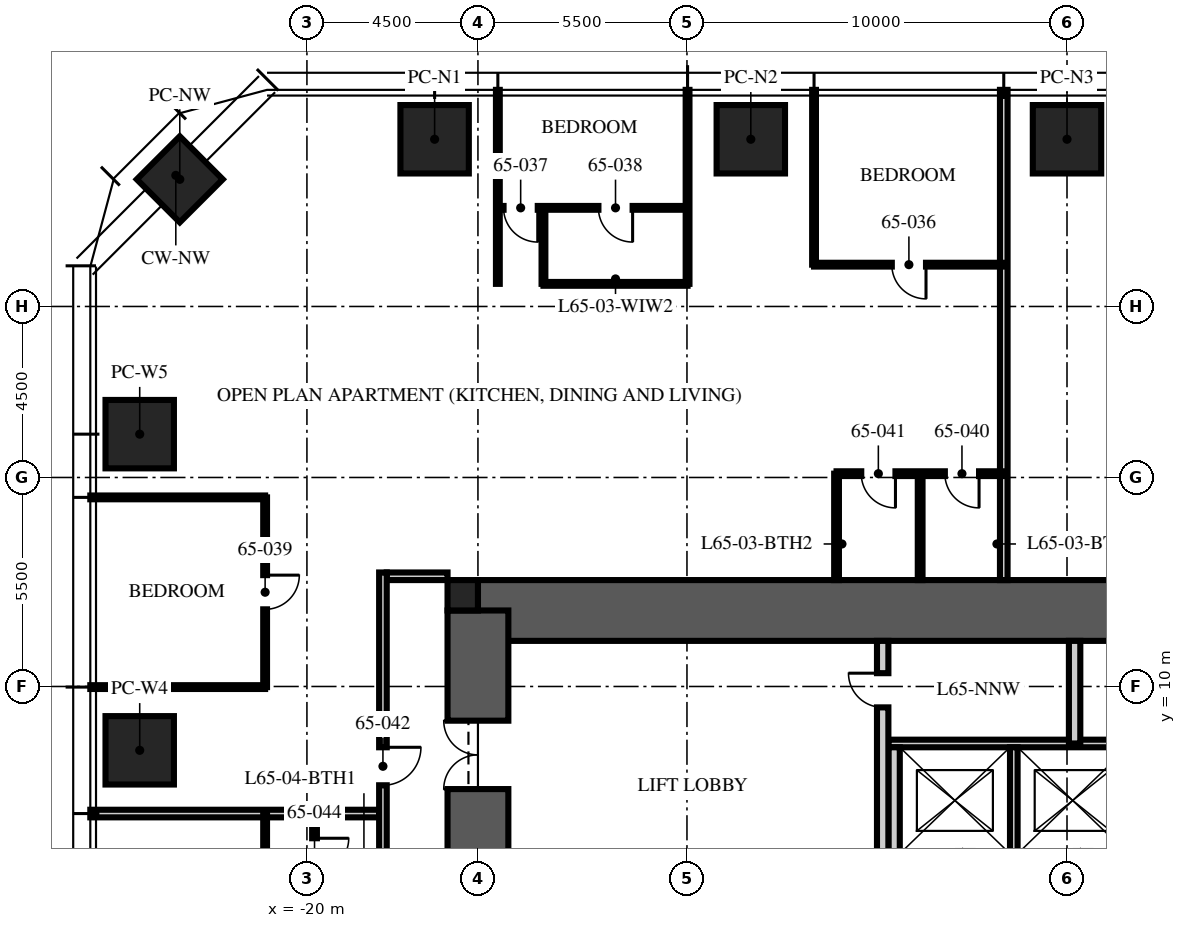
"""IFC4 building model, lengths in metres.
Left out: names, types, materials, properties, quantities, classifications, styles, units other than length and angle.
Written with IfcOpenShell. Run it as: python <this file> out.ifc"""

import sys

from ifc_helpers import new_model, si_unit, direction, frame, frame_2d, origin, origin_2d, place, context, subcontext, project, spatial, rectangle, extrude, element, fill, save


model = new_model("IFC4")
c1 = context("Model", 3, precision=1e-05, world=origin(), true_north=direction((0.0, 1.0)))
c2 = subcontext(c1, "Body", "Model", "MODEL_VIEW")
j1 = project(units=[si_unit("LENGTHUNIT", "METRE"), si_unit("PLANEANGLEUNIT", "RADIAN")], contexts=[c1])
p1 = place(None, origin())
s1 = spatial("IfcSite", under=j1, at=p1, CompositionType="ELEMENT")
p2 = place(p1, origin())
s2 = spatial("IfcBuilding", under=s1, at=p2, CompositionType="ELEMENT")
p3 = place(p2, frame((0.0, 0.0, 259.5)))
s3 = spatial("IfcBuildingStorey", under=s2, at=p3, CompositionType="ELEMENT", Elevation=259.5)
p4 = place(p3, frame((-15.5, 12.0, -0.25), z_axis=(0.0, 0.0, 1.0), x_axis=(1.0, 0.0, 0.0)))
e1 = element("IfcWall", 1, at=p4, inside=s3, PredefinedType="SHEAR", context=c2, shape_type="SweptSolid", body=[
    extrude(rectangle(XDim=31.0, YDim=1.6, at=frame_2d((15.5, 0.0))), origin(), (0.0, 0.0, 1.0), 3.75),
])
p5 = place(p3, frame((-15.5, -12.0, -0.25), z_axis=(0.0, 0.0, 1.0), x_axis=(0.0, 1.0, 0.0)))
e2 = element("IfcWall", 2, at=p5, inside=s3, PredefinedType="SHEAR", context=c2, shape_type="SweptSolid", body=[
    extrude(rectangle(XDim=24.0, YDim=1.6, at=frame_2d((12.0, 0.0))), origin(), (0.0, 0.0, 1.0), 3.75),
])
p6 = place(p5, frame((3.2, 0.0, 0.25)))
e3 = element("IfcOpeningElement", 3, at=p6, cuts=e2, PredefinedType="OPENING", context=c2, shape_type="SweptSolid", body=[
    extrude(rectangle(XDim=1.2, YDim=2.1, at=frame_2d((0.6, 1.05))), frame((0.0, 0.81, 0.0), z_axis=(0.0, -1.0, 0.0), x_axis=(1.0, 0.0, 0.0)), (0.0, 0.0, 1.0), 1.62),
])
p7 = place(p5, frame((19.3, 0.0, 0.25)))
e4 = element("IfcOpeningElement", 4, at=p7, cuts=e2, PredefinedType="OPENING", context=c2, shape_type="SweptSolid", body=[
    extrude(rectangle(XDim=1.8, YDim=2.1, at=frame_2d((0.9, 1.05))), frame((0.0, 0.81, 0.0), z_axis=(0.0, -1.0, 0.0), x_axis=(1.0, 0.0, 0.0)), (0.0, 0.0, 1.0), 1.62),
])
p8 = place(p3, frame((-15.9, 12.4, -0.25), z_axis=(0.0, 0.0, 1.0), x_axis=(1.0, 0.0, 0.0)))
e5 = element("IfcColumn", 5, at=p8, inside=s3, PredefinedType="COLUMN", context=c2, shape_type="SweptSolid", body=[
    extrude(rectangle(XDim=0.8, YDim=0.8, at=origin_2d()), origin(), (0.0, 0.0, 1.0), 3.75),
])
for number, where, z_axis, x_axis in (
    (6, (-16.64, 24.4, 0.0), (0.0, 0.0, 1.0), (1.0, 0.0, 0.0)),
    (7, (-8.32, 24.4, 0.0), (0.0, 0.0, 1.0), (1.0, 0.0, 0.0)),
    (8, (0.0, 24.4, 0.0), (0.0, 0.0, 1.0), (1.0, 0.0, 0.0)),
    (9, (-24.4, 8.32, 0.0), (0.0, 0.0, 1.0), (0.0, 1.0, 0.0)),
    (10, (-24.4, 16.64, 0.0), (0.0, 0.0, 1.0), (0.0, 1.0, 0.0)),
):
    element("IfcColumn", number, at=place(p3, frame(where, z_axis=z_axis, x_axis=x_axis)), inside=s3, PredefinedType="COLUMN", context=c2, shape_type="SweptSolid", body=[
        extrude(rectangle(XDim=1.8, YDim=1.8, at=origin_2d()), origin(), (0.0, 0.0, 1.0), 3.75),
    ])
p9 = place(p3, frame((-23.346, 23.346, 0.0), z_axis=(0.0, 0.0, 1.0), x_axis=(0.707106781187, 0.707106781187, 0.0)))
e11 = element("IfcColumn", 11, at=p9, inside=s3, PredefinedType="COLUMN", context=c2, shape_type="SweptSolid", body=[
    extrude(rectangle(XDim=1.6, YDim=1.6, at=origin_2d()), origin(), (0.0, 0.0, 1.0), 3.75),
])
p10 = place(p3, frame((-4.7, 8.5, 0.0), z_axis=(0.0, 0.0, 1.0), x_axis=(1.0, 0.0, 0.0)))
e12 = element("IfcWall", 12, at=p10, inside=s3, PredefinedType="PARTITIONING", context=c2, shape_type="SweptSolid", body=[
    extrude(rectangle(XDim=9.7, YDim=0.2, at=frame_2d((4.85, 0.0))), origin(), (0.0, 0.0, 1.0), 3.5),
])
p11 = place(p3, frame((-4.55, 5.6, 0.0), z_axis=(0.0, 0.0, 1.0), x_axis=(0.0, 1.0, 0.0)))
e13 = element("IfcWall", 13, at=p11, inside=s3, PredefinedType="PARTITIONING", context=c2, shape_type="SweptSolid", body=[
    extrude(rectangle(XDim=2.8, YDim=0.3, at=frame_2d((1.4, 0.0))), origin(), (0.0, 0.0, 1.0), 3.5),
])
p12 = place(p3, frame((-1.4, 5.6, 0.0), z_axis=(0.0, 0.0, 1.0), x_axis=(0.0, 1.0, 0.0)))
e14 = element("IfcWall", 14, at=p12, inside=s3, PredefinedType="PARTITIONING", context=c2, shape_type="SweptSolid", body=[
    extrude(rectangle(XDim=2.8, YDim=0.2, at=frame_2d((1.4, 0.0))), origin(), (0.0, 0.0, 1.0), 3.5),
])
p13 = place(p3, frame((-4.85, 5.3, 0.0), z_axis=(0.0, 0.0, 1.0), x_axis=(0.0, 1.0, 0.0)))
e15 = element("IfcWall", 15, at=p13, inside=s3, PredefinedType="PARTITIONING", context=c2, shape_type="SweptSolid", body=[
    extrude(rectangle(XDim=5.9, YDim=0.3, at=frame_2d((2.95, 0.0))), origin(), (0.0, 0.0, 1.0), 3.5),
])
p14 = place(p13, frame((4.15, 0.0, 0.0)))
e16 = element("IfcOpeningElement", 16, at=p14, cuts=e15, PredefinedType="OPENING", context=c2, shape_type="SweptSolid", body=[
    extrude(rectangle(XDim=0.9, YDim=2.1, at=frame_2d((0.45, 1.05))), frame((0.0, 0.16, 0.0), z_axis=(0.0, -1.0, 0.0), x_axis=(1.0, 0.0, 0.0)), (0.0, 0.0, 1.0), 0.32),
])
p15 = place(p3, frame((0.2, 8.5, 0.0), z_axis=(0.0, 0.0, 1.0), x_axis=(0.0, 1.0, 0.0)))
e17 = element("IfcWall", 17, at=p15, inside=s3, PredefinedType="PARTITIONING", context=c2, shape_type="SweptSolid", body=[
    extrude(rectangle(XDim=2.7, YDim=0.3, at=frame_2d((1.35, 0.0))), origin(), (0.0, 0.0, 1.0), 3.5),
])
p16 = place(p3, frame((-16.3, 12.9, 0.0), z_axis=(0.0, 0.0, 1.0), x_axis=(-1.0, 0.0, 0.0)))
e18 = element("IfcWall", 18, at=p16, inside=s3, PredefinedType="PARTITIONING", context=c2, shape_type="SweptSolid", body=[
    extrude(rectangle(XDim=1.6, YDim=0.2, at=frame_2d((0.8, 0.0))), origin(), (0.0, 0.0, 1.0), 2.3),
])
p17 = place(p3, frame((-1.664, 12.8, 0.0), z_axis=(0.0, 0.0, 1.0), x_axis=(0.0, 1.0, 0.0)))
e19 = element("IfcWall", 19, at=p17, inside=s3, PredefinedType="PARTITIONING", context=c2, shape_type="SweptSolid", body=[
    extrude(rectangle(XDim=12.9, YDim=0.2, at=frame_2d((6.45, 0.0))), origin(), (0.0, 0.0, 1.0), 2.91),
])
p18 = place(p3, frame((-6.656, 21.1, 0.0), z_axis=(0.0, 0.0, 1.0), x_axis=(0.0, 1.0, 0.0)))
e20 = element("IfcWall", 20, at=p18, inside=s3, PredefinedType="PARTITIONING", context=c2, shape_type="SweptSolid", body=[
    extrude(rectangle(XDim=4.6, YDim=0.1, at=frame_2d((2.3, 0.0))), origin(), (0.0, 0.0, 1.0), 2.91),
])
for number, where, z_axis, x_axis in (
    (21, (-9.984, 20.595, 0.0), (0.0, 0.0, 1.0), (0.0, 1.0, 0.0)),
    (22, (-14.976, 20.595, 0.0), (0.0, 0.0, 1.0), (0.0, 1.0, 0.0)),
):
    element("IfcWall", number, at=place(p3, frame(where, z_axis=z_axis, x_axis=x_axis)), inside=s3, PredefinedType="PARTITIONING", context=c2, shape_type="SweptSolid", body=[
        extrude(rectangle(XDim=5.105, YDim=0.1, at=frame_2d((2.552, 0.0))), origin(), (0.0, 0.0, 1.0), 2.91),
    ])
for number, where, z_axis, x_axis in (
    (23, (-21.1, 14.976, 0.0), (0.0, 0.0, 1.0), (-1.0, 0.0, 0.0)),
    (24, (-21.1, 9.984, 0.0), (0.0, 0.0, 1.0), (-1.0, 0.0, 0.0)),
):
    element("IfcWall", number, at=place(p3, frame(where, z_axis=z_axis, x_axis=x_axis)), inside=s3, PredefinedType="PARTITIONING", context=c2, shape_type="SweptSolid", body=[
        extrude(rectangle(XDim=4.6, YDim=0.1, at=frame_2d((2.3, 0.0))), origin(), (0.0, 0.0, 1.0), 2.91),
    ])
p19 = place(p3, frame((-18.1, 6.656, 0.0), z_axis=(0.0, 0.0, 1.0), x_axis=(-1.0, 0.0, 0.0)))
e25 = element("IfcWall", 25, at=p19, inside=s3, PredefinedType="PARTITIONING", context=c2, shape_type="SweptSolid", body=[
    extrude(rectangle(XDim=7.6, YDim=0.2, at=frame_2d((3.8, 0.0))), origin(), (0.0, 0.0, 1.0), 2.91),
])
p20 = place(p3, frame((-1.664, 21.1, 0.0), z_axis=(0.0, 0.0, 1.0), x_axis=(-1.0, 0.0, 0.0)))
e26 = element("IfcWall", 26, at=p20, inside=s3, PredefinedType="PARTITIONING", context=c2, shape_type="SweptSolid", body=[
    extrude(rectangle(XDim=4.992, YDim=0.1, at=frame_2d((2.496, 0.0))), origin(), (0.0, 0.0, 1.0), 2.81),
])
p21 = place(p20, frame((2.046, 0.0, 0.0)))
e27 = element("IfcOpeningElement", 27, at=p21, cuts=e26, PredefinedType="OPENING", context=c2, shape_type="SweptSolid", body=[
    extrude(rectangle(XDim=0.9, YDim=2.1, at=frame_2d((0.45, 1.05))), frame((0.0, 0.06, 0.0), z_axis=(0.0, -1.0, 0.0), x_axis=(1.0, 0.0, 0.0)), (0.0, 0.0, 1.0), 0.12),
])
p22 = place(p3, frame((-9.984, 22.595, 0.0), z_axis=(0.0, 0.0, 1.0), x_axis=(-1.0, 0.0, 0.0)))
e28 = element("IfcWall", 28, at=p22, inside=s3, PredefinedType="PARTITIONING", context=c2, shape_type="SweptSolid", body=[
    extrude(rectangle(XDim=4.992, YDim=0.1, at=frame_2d((2.496, 0.0))), origin(), (0.0, 0.0, 1.0), 2.81),
])
p23 = place(p22, frame((3.942, 0.0, 0.0)))
e29 = element("IfcOpeningElement", 29, at=p23, cuts=e28, PredefinedType="OPENING", context=c2, shape_type="SweptSolid", body=[
    extrude(rectangle(XDim=0.9, YDim=2.1, at=frame_2d((0.45, 1.05))), frame((0.0, 0.06, 0.0), z_axis=(0.0, -1.0, 0.0), x_axis=(1.0, 0.0, 0.0)), (0.0, 0.0, 1.0), 0.12),
])
p24 = place(p22, frame((1.446, 0.0, 0.0)))
e30 = element("IfcOpeningElement", 30, at=p24, cuts=e28, PredefinedType="OPENING", context=c2, shape_type="SweptSolid", body=[
    extrude(rectangle(XDim=0.9, YDim=2.1, at=frame_2d((0.45, 1.05))), frame((0.0, 0.06, 0.0), z_axis=(0.0, -1.0, 0.0), x_axis=(1.0, 0.0, 0.0)), (0.0, 0.0, 1.0), 0.12),
])
p25 = place(p3, frame((-13.776, 20.595, 0.0), z_axis=(0.0, 0.0, 1.0), x_axis=(0.0, 1.0, 0.0)))
e31 = element("IfcWall", 31, at=p25, inside=s3, PredefinedType="PARTITIONING", context=c2, shape_type="SweptSolid", body=[
    extrude(rectangle(XDim=2.0, YDim=0.1, at=frame_2d((1.0, 0.0))), origin(), (0.0, 0.0, 1.0), 3.5),
])
p26 = place(p3, frame((-9.984, 20.595, 0.0), z_axis=(0.0, 0.0, 1.0), x_axis=(-1.0, 0.0, 0.0)))
e32 = element("IfcWall", 32, at=p26, inside=s3, PredefinedType="PARTITIONING", context=c2, shape_type="SweptSolid", body=[
    extrude(rectangle(XDim=3.792, YDim=0.1, at=frame_2d((1.896, 0.0))), origin(), (0.0, 0.0, 1.0), 2.81),
])
p27 = place(p3, frame((-21.1, 14.976, 0.0), z_axis=(0.0, 0.0, 1.0), x_axis=(0.0, -1.0, 0.0)))
e33 = element("IfcWall", 33, at=p27, inside=s3, PredefinedType="PARTITIONING", context=c2, shape_type="SweptSolid", body=[
    extrude(rectangle(XDim=4.992, YDim=0.1, at=frame_2d((2.496, 0.0))), origin(), (0.0, 0.0, 1.0), 2.81),
])
p28 = place(p27, frame((2.046, 0.0, 0.0)))
e34 = element("IfcOpeningElement", 34, at=p28, cuts=e33, PredefinedType="OPENING", context=c2, shape_type="SweptSolid", body=[
    extrude(rectangle(XDim=0.9, YDim=2.1, at=frame_2d((0.45, 1.05))), frame((0.0, 0.06, 0.0), z_axis=(0.0, -1.0, 0.0), x_axis=(1.0, 0.0, 0.0)), (0.0, 0.0, 1.0), 0.12),
])
p29 = place(p3, frame((-1.664, 15.6, 0.0), z_axis=(0.0, 0.0, 1.0), x_axis=(-1.0, 0.0, 0.0)))
e35 = element("IfcWall", 35, at=p29, inside=s3, PredefinedType="PARTITIONING", context=c2, shape_type="SweptSolid", body=[
    extrude(rectangle(XDim=4.4, YDim=0.125, at=frame_2d((2.2, 0.0))), origin(), (0.0, 0.0, 1.0), 2.81),
])
p30 = place(p29, frame((0.65, 0.0, 0.0)))
e36 = element("IfcOpeningElement", 36, at=p30, cuts=e35, PredefinedType="OPENING", context=c2, shape_type="SweptSolid", body=[
    extrude(rectangle(XDim=0.9, YDim=2.1, at=frame_2d((0.45, 1.05))), frame((0.0, 0.073, 0.0), z_axis=(0.0, -1.0, 0.0), x_axis=(1.0, 0.0, 0.0)), (0.0, 0.0, 1.0), 0.145),
])
p31 = place(p29, frame((2.85, 0.0, 0.0)))
e37 = element("IfcOpeningElement", 37, at=p31, cuts=e35, PredefinedType="OPENING", context=c2, shape_type="SweptSolid", body=[
    extrude(rectangle(XDim=0.9, YDim=2.1, at=frame_2d((0.45, 1.05))), frame((0.0, 0.073, 0.0), z_axis=(0.0, -1.0, 0.0), x_axis=(1.0, 0.0, 0.0)), (0.0, 0.0, 1.0), 0.145),
])
for number, where, z_axis, x_axis in (
    (38, (-3.864, 12.8, 0.0), (0.0, 0.0, 1.0), (0.0, 1.0, 0.0)),
    (39, (-6.064, 12.8, 0.0), (0.0, 0.0, 1.0), (0.0, 1.0, 0.0)),
):
    element("IfcWall", number, at=place(p3, frame(where, z_axis=z_axis, x_axis=x_axis)), inside=s3, PredefinedType="PARTITIONING", context=c2, shape_type="SweptSolid", body=[
        extrude(rectangle(XDim=2.8, YDim=0.125, at=frame_2d((1.4, 0.0))), origin(), (0.0, 0.0, 1.0), 3.5),
    ])
p32 = place(p3, frame((-21.1, 6.656, 0.0), z_axis=(0.0, 0.0, 1.0), x_axis=(0.0, -1.0, 0.0)))
e40 = element("IfcWall", 40, at=p32, inside=s3, PredefinedType="PARTITIONING", context=c2, shape_type="SweptSolid", body=[
    extrude(rectangle(XDim=4.992, YDim=0.1, at=frame_2d((2.496, 0.0))), origin(), (0.0, 0.0, 1.0), 2.81),
])
p33 = place(p32, frame((2.046, 0.0, 0.0)))
e41 = element("IfcOpeningElement", 41, at=p33, cuts=e40, PredefinedType="OPENING", context=c2, shape_type="SweptSolid", body=[
    extrude(rectangle(XDim=0.9, YDim=2.1, at=frame_2d((0.45, 1.05))), frame((0.0, 0.06, 0.0), z_axis=(0.0, -1.0, 0.0), x_axis=(1.0, 0.0, 0.0)), (0.0, 0.0, 1.0), 0.12),
])
p34 = place(p3, frame((-19.8, 6.656, 0.0), z_axis=(0.0, 0.0, 1.0), x_axis=(0.0, -1.0, 0.0)))
e42 = element("IfcWall", 42, at=p34, inside=s3, PredefinedType="PARTITIONING", context=c2, shape_type="SweptSolid", body=[
    extrude(rectangle(XDim=2.2, YDim=0.125, at=frame_2d((1.1, 0.0))), origin(), (0.0, 0.0, 1.0), 3.5),
])
p35 = place(p34, frame((0.65, 0.0, 0.0)))
e43 = element("IfcOpeningElement", 43, at=p35, cuts=e42, PredefinedType="OPENING", context=c2, shape_type="SweptSolid", body=[
    extrude(rectangle(XDim=0.9, YDim=2.1, at=frame_2d((0.45, 1.05))), frame((0.0, 0.073, 0.0), z_axis=(0.0, -1.0, 0.0), x_axis=(1.0, 0.0, 0.0)), (0.0, 0.0, 1.0), 0.145),
])
p36 = place(p3, frame((-18.0, 13.0, 0.0), z_axis=(0.0, 0.0, 1.0), x_axis=(0.0, -1.0, 0.0)))
e44 = element("IfcWall", 44, at=p36, inside=s3, PredefinedType="PARTITIONING", context=c2, shape_type="SweptSolid", body=[
    extrude(rectangle(XDim=25.8, YDim=0.2, at=frame_2d((12.9, 0.0))), origin(), (0.0, 0.0, 1.0), 2.6),
])
p37 = place(p36, frame((4.6, 0.0, 0.0)))
e45 = element("IfcOpeningElement", 45, at=p37, cuts=e44, PredefinedType="OPENING", context=c2, shape_type="SweptSolid", body=[
    extrude(rectangle(XDim=1.0, YDim=2.2, at=frame_2d((0.5, 1.1))), frame((0.0, 0.11, 0.0), z_axis=(0.0, -1.0, 0.0), x_axis=(1.0, 0.0, 0.0)), (0.0, 0.0, 1.0), 0.22),
])
p38 = place(p36, frame((13.114, 0.0, 0.0)))
e46 = element("IfcOpeningElement", 46, at=p38, cuts=e44, PredefinedType="OPENING", context=c2, shape_type="SweptSolid", body=[
    extrude(rectangle(XDim=1.0, YDim=2.2, at=frame_2d((0.5, 1.1))), frame((0.0, 0.11, 0.0), z_axis=(0.0, -1.0, 0.0), x_axis=(1.0, 0.0, 0.0)), (0.0, 0.0, 1.0), 0.22),
])
p39 = place(p36, frame((23.684, 0.0, 0.0)))
e47 = element("IfcOpeningElement", 47, at=p39, cuts=e44, PredefinedType="OPENING", context=c2, shape_type="SweptSolid", body=[
    extrude(rectangle(XDim=1.0, YDim=2.2, at=frame_2d((0.5, 1.1))), frame((0.0, 0.11, 0.0), z_axis=(0.0, -1.0, 0.0), x_axis=(1.0, 0.0, 0.0)), (0.0, 0.0, 1.0), 0.22),
])
p40 = place(p7, origin())
e48 = element("IfcDoor", 48, at=p40, inside=s3, OperationType="DOUBLE_DOOR_SINGLE_SWING", PredefinedType="DOOR", context=c2, shape_type="SweptSolid", body=[
    extrude(rectangle(XDim=1.8, YDim=2.1, at=frame_2d((0.9, 1.05))), frame((0.0, 0.025, 0.0), z_axis=(0.0, -1.0, 0.0), x_axis=(1.0, 0.0, 0.0)), (0.0, 0.0, 1.0), 0.05),
])
fill(e4, e48)
p41 = place(p14, origin())
e49 = element("IfcDoor", 49, at=p41, inside=s3, OperationType="SINGLE_SWING_RIGHT", PredefinedType="DOOR", context=c2, shape_type="SweptSolid", body=[
    extrude(rectangle(XDim=0.9, YDim=2.1, at=frame_2d((0.45, 1.05))), frame((0.0, 0.025, 0.0), z_axis=(0.0, -1.0, 0.0), x_axis=(1.0, 0.0, 0.0)), (0.0, 0.0, 1.0), 0.05),
])
fill(e16, e49)
p42 = place(p21, origin())
e50 = element("IfcDoor", 50, at=p42, inside=s3, OperationType="SINGLE_SWING_LEFT", PredefinedType="DOOR", context=c2, shape_type="SweptSolid", body=[
    extrude(rectangle(XDim=0.9, YDim=2.1, at=frame_2d((0.45, 1.05))), frame((0.0, 0.025, 0.0), z_axis=(0.0, -1.0, 0.0), x_axis=(1.0, 0.0, 0.0)), (0.0, 0.0, 1.0), 0.05),
])
fill(e27, e50)
p43 = place(p23, origin())
e51 = element("IfcDoor", 51, at=p43, inside=s3, OperationType="SINGLE_SWING_LEFT", PredefinedType="DOOR", context=c2, shape_type="SweptSolid", body=[
    extrude(rectangle(XDim=0.9, YDim=2.1, at=frame_2d((0.45, 1.05))), frame((0.0, 0.025, 0.0), z_axis=(0.0, -1.0, 0.0), x_axis=(1.0, 0.0, 0.0)), (0.0, 0.0, 1.0), 0.05),
])
fill(e29, e51)
p44 = place(p24, origin())
e52 = element("IfcDoor", 52, at=p44, inside=s3, OperationType="SINGLE_SWING_LEFT", PredefinedType="DOOR", context=c2, shape_type="SweptSolid", body=[
    extrude(rectangle(XDim=0.9, YDim=2.1, at=frame_2d((0.45, 1.05))), frame((0.0, 0.025, 0.0), z_axis=(0.0, -1.0, 0.0), x_axis=(1.0, 0.0, 0.0)), (0.0, 0.0, 1.0), 0.05),
])
fill(e30, e52)
p45 = place(p28, origin())
e53 = element("IfcDoor", 53, at=p45, inside=s3, OperationType="SINGLE_SWING_LEFT", PredefinedType="DOOR", context=c2, shape_type="SweptSolid", body=[
    extrude(rectangle(XDim=0.9, YDim=2.1, at=frame_2d((0.45, 1.05))), frame((0.0, 0.025, 0.0), z_axis=(0.0, -1.0, 0.0), x_axis=(1.0, 0.0, 0.0)), (0.0, 0.0, 1.0), 0.05),
])
fill(e34, e53)
p46 = place(p30, origin())
e54 = element("IfcDoor", 54, at=p46, inside=s3, OperationType="SINGLE_SWING_LEFT", PredefinedType="DOOR", context=c2, shape_type="SweptSolid", body=[
    extrude(rectangle(XDim=0.9, YDim=2.1, at=frame_2d((0.45, 1.05))), frame((0.0, 0.025, 0.0), z_axis=(0.0, -1.0, 0.0), x_axis=(1.0, 0.0, 0.0)), (0.0, 0.0, 1.0), 0.05),
])
fill(e36, e54)
p47 = place(p31, origin())
e55 = element("IfcDoor", 55, at=p47, inside=s3, OperationType="SINGLE_SWING_LEFT", PredefinedType="DOOR", context=c2, shape_type="SweptSolid", body=[
    extrude(rectangle(XDim=0.9, YDim=2.1, at=frame_2d((0.45, 1.05))), frame((0.0, 0.025, 0.0), z_axis=(0.0, -1.0, 0.0), x_axis=(1.0, 0.0, 0.0)), (0.0, 0.0, 1.0), 0.05),
])
fill(e37, e55)
p48 = place(p37, origin())
e56 = element("IfcDoor", 56, at=p48, inside=s3, OperationType="SINGLE_SWING_LEFT", PredefinedType="DOOR", context=c2, shape_type="SweptSolid", body=[
    extrude(rectangle(XDim=1.0, YDim=2.2, at=frame_2d((0.5, 1.1))), frame((0.0, 0.025, 0.0), z_axis=(0.0, -1.0, 0.0), x_axis=(1.0, 0.0, 0.0)), (0.0, 0.0, 1.0), 0.05),
])
fill(e45, e56)
p49 = place(p35, origin())
e57 = element("IfcDoor", 57, at=p49, inside=s3, OperationType="SINGLE_SWING_LEFT", PredefinedType="DOOR", context=c2, shape_type="SweptSolid", body=[
    extrude(rectangle(XDim=0.9, YDim=2.1, at=frame_2d((0.45, 1.05))), frame((0.0, 0.025, 0.0), z_axis=(0.0, -1.0, 0.0), x_axis=(1.0, 0.0, 0.0)), (0.0, 0.0, 1.0), 0.05),
])
fill(e43, e57)
save(model, sys.argv[1])
